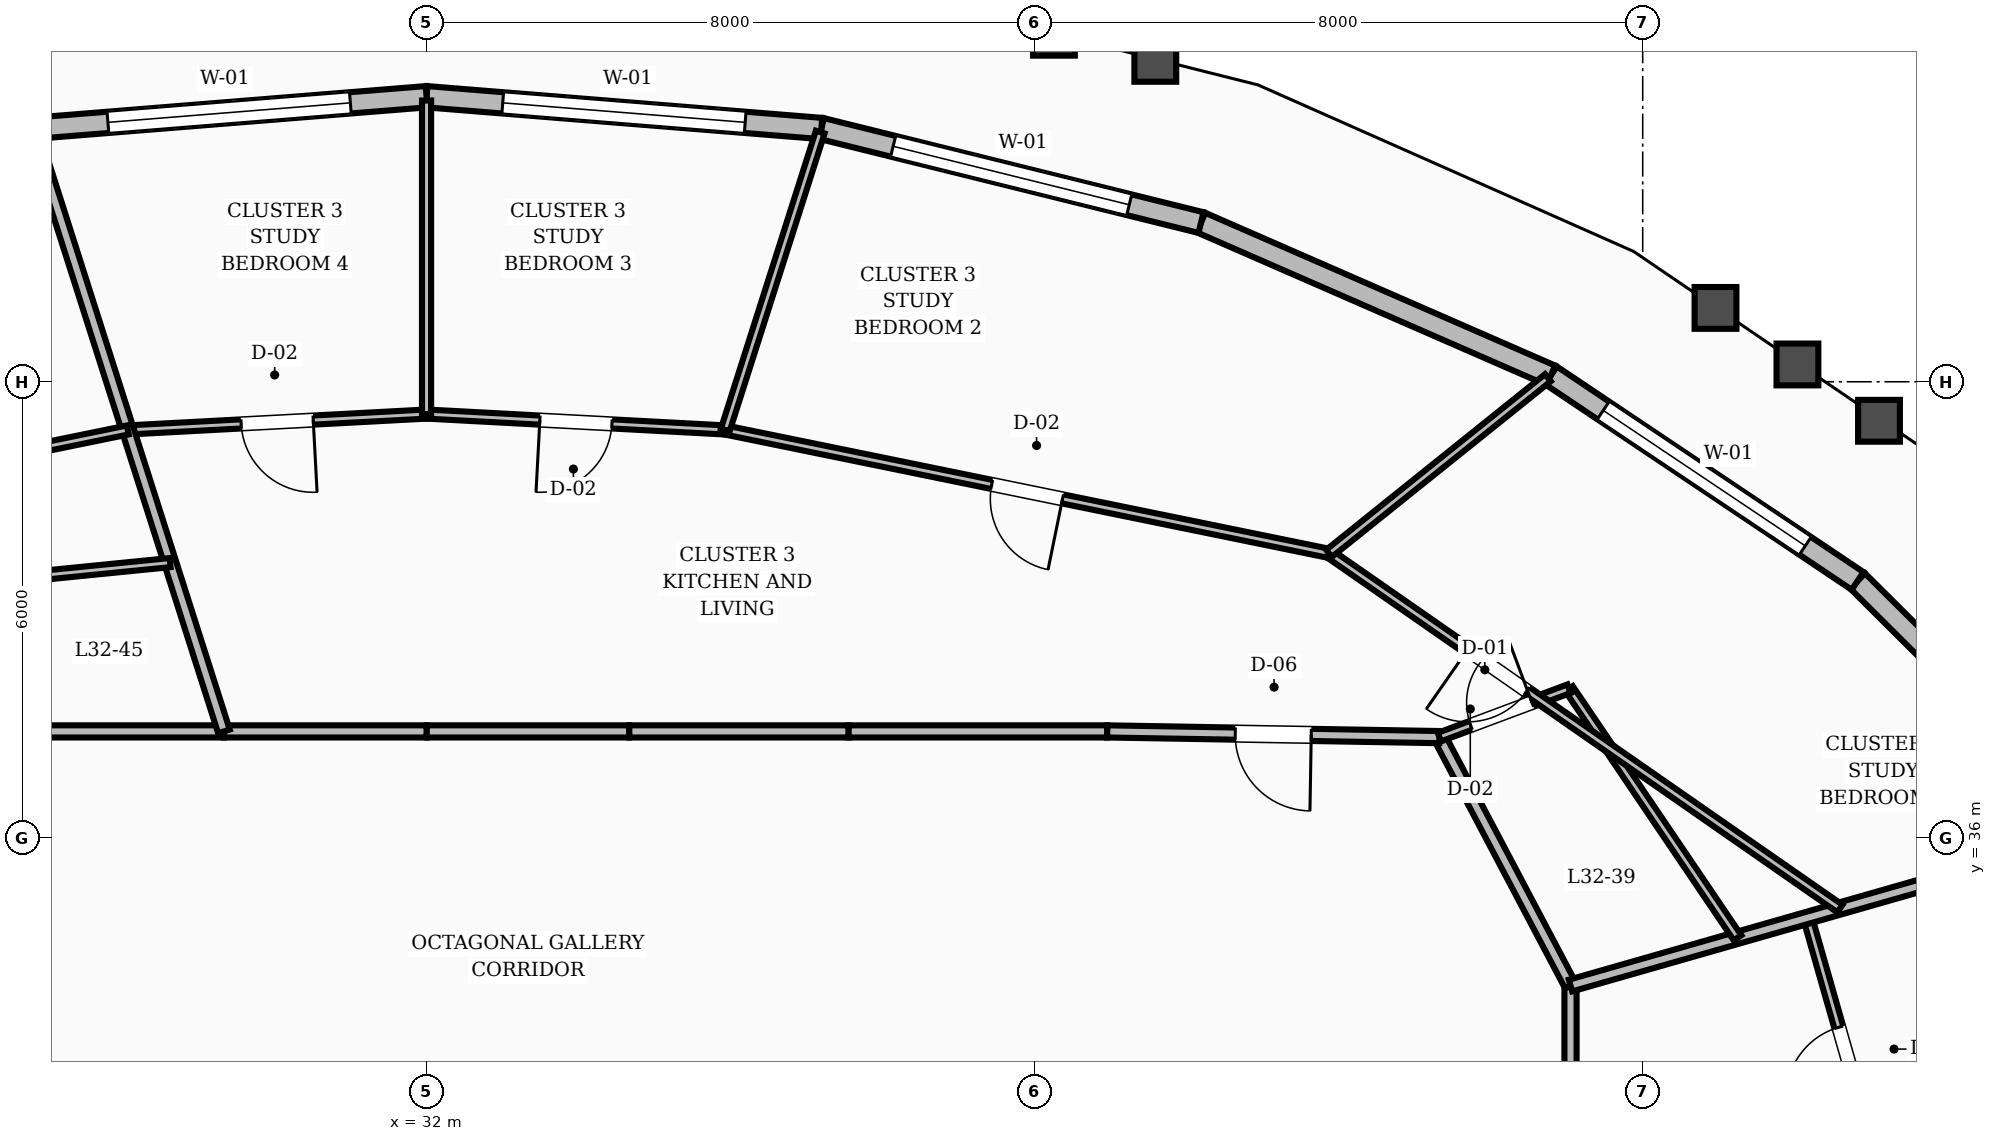
"""IFC4 building model, lengths in metres.
Left out: names, types, materials, properties, quantities, classifications, styles, units other than length and angle.
Written with IfcOpenShell. Run it as: python <this file> out.ifc"""

import sys

from ifc_helpers import new_model, si_unit, direction, frame, frame_2d, origin, place, context, subcontext, project, spatial, rectangle, extrude, element, fill, save


model = new_model("IFC4")
c1 = context("Model", 3, precision=1e-05, world=origin(), true_north=direction((0.0, 1.0)))
c2 = subcontext(c1, "Body", "Model", "MODEL_VIEW")
j1 = project(units=[si_unit("LENGTHUNIT", "METRE"), si_unit("PLANEANGLEUNIT", "RADIAN")], contexts=[c1])
p1 = place(None, origin())
s1 = spatial("IfcSite", under=j1, at=p1, CompositionType="ELEMENT")
p2 = place(p1, origin())
s2 = spatial("IfcBuilding", under=s1, at=p2, CompositionType="ELEMENT")
p3 = place(p2, frame((0.0, 0.0, 128.0)))
s3 = spatial("IfcBuildingStorey", under=s2, at=p3, CompositionType="ELEMENT", Elevation=128.0)
p4 = place(p3, frame((54.138, 36.083, 0.0), z_axis=(0.0, 0.0, 1.0), x_axis=(-0.708724927863, 0.705484923032, 0.0)))
e1 = element("IfcWall", 1, at=p4, inside=s3, PredefinedType="STANDARD", context=c2, shape_type="SweptSolid", body=[
    extrude(rectangle(XDim=4.672, YDim=0.28, at=frame_2d((2.336, 0.0))), origin(), (0.0, 0.0, 1.0), 2.82),
])
p5 = place(p3, frame((50.827, 39.379, 0.0), z_axis=(0.0, 0.0, 1.0), x_axis=(-0.830609353865, 0.556855547941, 0.0)))
e2 = element("IfcWall", 2, at=p5, inside=s3, PredefinedType="STANDARD", context=c2, shape_type="SweptSolid", body=[
    extrude(rectangle(XDim=4.858, YDim=0.28, at=frame_2d((2.429, 0.0))), origin(), (0.0, 0.0, 1.0), 2.82),
])
p6 = place(p5, frame((0.829, 0.0, 0.8)))
e3 = element("IfcOpeningElement", 3, at=p6, cuts=e2, PredefinedType="OPENING", context=c2, shape_type="SweptSolid", body=[
    extrude(rectangle(XDim=3.2, YDim=1.65, at=frame_2d((1.6, 0.825))), frame((0.0, 0.15, 0.0), z_axis=(0.0, -1.0, 0.0), x_axis=(1.0, 0.0, 0.0)), (0.0, 0.0, 1.0), 0.3),
])
p7 = place(p3, frame((46.792, 42.084, 0.0), z_axis=(0.0, 0.0, 1.0), x_axis=(-0.916453831221, 0.400140444394, 0.0)))
e4 = element("IfcWall", 4, at=p7, inside=s3, PredefinedType="STANDARD", context=c2, shape_type="SweptSolid", body=[
    extrude(rectangle(XDim=5.023, YDim=0.28, at=frame_2d((2.511, 0.0))), origin(), (0.0, 0.0, 1.0), 2.82),
])
p8 = place(p3, frame((42.189, 44.094, 0.0), z_axis=(0.0, 0.0, 1.0), x_axis=(-0.970639991073, 0.240536915526, 0.0)))
e5 = element("IfcWall", 5, at=p8, inside=s3, PredefinedType="STANDARD", context=c2, shape_type="SweptSolid", body=[
    extrude(rectangle(XDim=5.146, YDim=0.28, at=frame_2d((2.573, 0.0))), origin(), (0.0, 0.0, 1.0), 2.82),
])
p9 = place(p8, frame((0.973, 0.0, 0.8)))
e6 = element("IfcOpeningElement", 6, at=p9, cuts=e5, PredefinedType="OPENING", context=c2, shape_type="SweptSolid", body=[
    extrude(rectangle(XDim=3.2, YDim=1.65, at=frame_2d((1.6, 0.825))), frame((0.0, 0.15, 0.0), z_axis=(0.0, -1.0, 0.0), x_axis=(1.0, 0.0, 0.0)), (0.0, 0.0, 1.0), 0.3),
])
p10 = place(p3, frame((37.194, 45.332, 0.0), z_axis=(0.0, 0.0, 1.0), x_axis=(-0.996778227936, 0.080207009129, 0.0)))
e7 = element("IfcWall", 7, at=p10, inside=s3, PredefinedType="STANDARD", context=c2, shape_type="SweptSolid", body=[
    extrude(rectangle(XDim=5.211, YDim=0.28, at=frame_2d((2.605, 0.0))), origin(), (0.0, 0.0, 1.0), 2.82),
])
p11 = place(p10, frame((1.006, 0.0, 0.8)))
e8 = element("IfcOpeningElement", 8, at=p11, cuts=e7, PredefinedType="OPENING", context=c2, shape_type="SweptSolid", body=[
    extrude(rectangle(XDim=3.2, YDim=1.65, at=frame_2d((1.6, 0.825))), frame((0.0, 0.15, 0.0), z_axis=(0.0, -1.0, 0.0), x_axis=(1.0, 0.0, 0.0)), (0.0, 0.0, 1.0), 0.3),
])
p12 = place(p3, frame((32.0, 45.75, 0.0), z_axis=(0.0, 0.0, 1.0), x_axis=(-0.996778227936, -0.080207009129, 0.0)))
e9 = element("IfcWall", 9, at=p12, inside=s3, PredefinedType="STANDARD", context=c2, shape_type="SweptSolid", body=[
    extrude(rectangle(XDim=5.211, YDim=0.28, at=frame_2d((2.605, 0.0))), origin(), (0.0, 0.0, 1.0), 2.82),
])
p13 = place(p12, frame((1.006, 0.0, 0.8)))
e10 = element("IfcOpeningElement", 10, at=p13, cuts=e9, PredefinedType="OPENING", context=c2, shape_type="SweptSolid", body=[
    extrude(rectangle(XDim=3.2, YDim=1.65, at=frame_2d((1.6, 0.825))), frame((0.0, 0.15, 0.0), z_axis=(0.0, -1.0, 0.0), x_axis=(1.0, 0.0, 0.0)), (0.0, 0.0, 1.0), 0.3),
])
p14 = place(p3, frame((47.05, 30.234, 0.0), z_axis=(0.0, 0.0, 1.0), x_axis=(0.0, 1.0, 0.0)))
e11 = element("IfcWall", 11, at=p14, inside=s3, PredefinedType="SOLIDWALL", context=c2, shape_type="SweptSolid", body=[
    extrude(rectangle(XDim=3.822, YDim=0.16, at=frame_2d((1.911, 0.0))), origin(), (0.0, 0.0, 1.0), 2.8),
])
p15 = place(p3, frame((47.05, 34.056, 0.0), z_axis=(0.0, 0.0, 1.0), x_axis=(-0.466737093093, 0.884396113702, 0.0)))
e12 = element("IfcWall", 12, at=p15, inside=s3, PredefinedType="SOLIDWALL", context=c2, shape_type="SweptSolid", body=[
    extrude(rectangle(XDim=3.696, YDim=0.16, at=frame_2d((1.848, 0.0))), origin(), (0.0, 0.0, 1.0), 2.8),
])
p16 = place(p3, frame((45.325, 37.325, 0.0), z_axis=(0.0, 0.0, 1.0), x_axis=(-0.999853038912, 0.017143528788, 0.0)))
e13 = element("IfcWall", 13, at=p16, inside=s3, PredefinedType="SOLIDWALL", context=c2, shape_type="SweptSolid", body=[
    extrude(rectangle(XDim=4.372, YDim=0.16, at=frame_2d((2.186, 0.0))), origin(), (0.0, 0.0, 1.0), 2.8),
])
p17 = place(p16, frame((1.686, 0.0, 0.0)))
e14 = element("IfcOpeningElement", 14, at=p17, cuts=e13, PredefinedType="OPENING", context=c2, shape_type="SweptSolid", body=[
    extrude(rectangle(XDim=1.0, YDim=2.1, at=frame_2d((0.5, 1.05))), frame((0.0, 0.09, 0.0), z_axis=(0.0, -1.0, 0.0), x_axis=(1.0, 0.0, 0.0)), (0.0, 0.0, 1.0), 0.18),
])
p18 = place(p3, frame((40.954, 37.4, 0.0), z_axis=(0.0, 0.0, 1.0), x_axis=(-1.0, 0.0, 0.0)))
e15 = element("IfcWall", 15, at=p18, inside=s3, PredefinedType="SOLIDWALL", context=c2, shape_type="SweptSolid", body=[
    extrude(rectangle(XDim=3.403, YDim=0.16, at=frame_2d((1.702, 0.0))), origin(), (0.0, 0.0, 1.0), 2.8),
])
p19 = place(p3, frame((37.551, 37.4, 0.0), z_axis=(0.0, 0.0, 1.0), x_axis=(-1.0, 0.0, 0.0)))
e16 = element("IfcWall", 16, at=p19, inside=s3, PredefinedType="SOLIDWALL", context=c2, shape_type="SweptSolid", body=[
    extrude(rectangle(XDim=2.885, YDim=0.16, at=frame_2d((1.443, 0.0))), origin(), (0.0, 0.0, 1.0), 2.8),
])
for number, where, z_axis, x_axis in (
    (17, (34.665, 37.4, 0.0), (0.0, 0.0, 1.0), (-1.0, 0.0, 0.0)),
    (18, (32.0, 37.4, 0.0), (0.0, 0.0, 1.0), (-1.0, 0.0, 0.0)),
):
    element("IfcWall", number, at=place(p3, frame(where, z_axis=z_axis, x_axis=x_axis)), inside=s3, PredefinedType="SOLIDWALL", context=c2, shape_type="SweptSolid", body=[
        extrude(rectangle(XDim=2.665, YDim=0.16, at=frame_2d((1.333, 0.0))), origin(), (0.0, 0.0, 1.0), 2.8),
    ])
p20 = place(p3, frame((29.335, 37.4, 0.0), z_axis=(0.0, 0.0, 1.0), x_axis=(-1.0, 0.0, 0.0)))
e19 = element("IfcWall", 19, at=p20, inside=s3, PredefinedType="SOLIDWALL", context=c2, shape_type="SweptSolid", body=[
    extrude(rectangle(XDim=2.885, YDim=0.16, at=frame_2d((1.443, 0.0))), origin(), (0.0, 0.0, 1.0), 2.8),
])
p21 = place(p3, frame((51.251, 31.153, 0.0), z_axis=(0.0, 0.0, 1.0), x_axis=(-0.274312555961, 0.9616405886, 0.0)))
e20 = element("IfcWall", 20, at=p21, inside=s3, PredefinedType="PARTITIONING", context=c2, shape_type="SweptSolid", body=[
    extrude(rectangle(XDim=3.946, YDim=0.12, at=frame_2d((1.973, 0.0))), origin(), (0.0, 0.0, 1.0), 2.8),
])
p22 = place(p21, frame((1.498, 0.0, 0.0)))
e21 = element("IfcOpeningElement", 21, at=p22, cuts=e20, PredefinedType="OPENING", context=c2, shape_type="SweptSolid", body=[
    extrude(rectangle(XDim=0.95, YDim=2.1, at=frame_2d((0.475, 1.05))), frame((0.0, 0.07, 0.0), z_axis=(0.0, -1.0, 0.0), x_axis=(1.0, 0.0, 0.0)), (0.0, 0.0, 1.0), 0.14),
])
p23 = place(p3, frame((47.05, 34.056, 0.0), z_axis=(0.0, 0.0, 1.0), x_axis=(0.961443382808, 0.275002948446, 0.0)))
e22 = element("IfcWall", 22, at=p23, inside=s3, PredefinedType="SOLIDWALL", context=c2, shape_type="SweptSolid", body=[
    extrude(rectangle(XDim=7.322, YDim=0.16, at=frame_2d((3.661, 0.0))), origin(), (0.0, 0.0, 1.0), 2.8),
])
p24 = place(p3, frame((49.247, 34.685, 0.0), z_axis=(0.0, 0.0, 1.0), x_axis=(-0.560227188168, 0.828338999225, 0.0)))
e23 = element("IfcWall", 23, at=p24, inside=s3, PredefinedType="PARTITIONING", context=c2, shape_type="SweptSolid", body=[
    extrude(rectangle(XDim=3.957, YDim=0.12, at=frame_2d((1.978, 0.0))), origin(), (0.0, 0.0, 1.0), 2.8),
])
p25 = place(p3, frame((45.325, 37.325, 0.0), z_axis=(0.0, 0.0, 1.0), x_axis=(0.936818667413, 0.349815357561, 0.0)))
e24 = element("IfcWall", 24, at=p25, inside=s3, PredefinedType="PARTITIONING", context=c2, shape_type="SweptSolid", body=[
    extrude(rectangle(XDim=1.821, YDim=0.12, at=frame_2d((0.91, 0.0))), origin(), (0.0, 0.0, 1.0), 2.8),
])
p26 = place(p25, frame((0.44, 0.0, 0.0)))
e25 = element("IfcOpeningElement", 25, at=p26, cuts=e24, PredefinedType="OPENING", context=c2, shape_type="SweptSolid", body=[
    extrude(rectangle(XDim=0.86, YDim=2.1, at=frame_2d((0.43, 1.05))), frame((0.0, 0.07, 0.0), z_axis=(0.0, -1.0, 0.0), x_axis=(1.0, 0.0, 0.0)), (0.0, 0.0, 1.0), 0.14),
])
p27 = place(p3, frame((50.594, 35.07, 0.0), z_axis=(0.0, 0.0, 1.0), x_axis=(-0.821081459347, 0.570811034508, 0.0)))
e26 = element("IfcWall", 26, at=p27, inside=s3, PredefinedType="PARTITIONING", context=c2, shape_type="SweptSolid", body=[
    extrude(rectangle(XDim=8.186, YDim=0.12, at=frame_2d((4.093, 0.0))), origin(), (0.0, 0.0, 1.0), 2.8),
])
p28 = place(p27, frame((5.016, 0.0, 0.0)))
e27 = element("IfcOpeningElement", 27, at=p28, cuts=e26, PredefinedType="OPENING", context=c2, shape_type="SweptSolid", body=[
    extrude(rectangle(XDim=0.95, YDim=2.1, at=frame_2d((0.475, 1.05))), frame((0.0, 0.07, 0.0), z_axis=(0.0, -1.0, 0.0), x_axis=(1.0, 0.0, 0.0)), (0.0, 0.0, 1.0), 0.14),
])
p29 = place(p3, frame((43.873, 39.742, 0.0), z_axis=(0.0, 0.0, 1.0), x_axis=(-0.979737902763, 0.20028390322, 0.0)))
e28 = element("IfcWall", 28, at=p29, inside=s3, PredefinedType="PARTITIONING", context=c2, shape_type="SweptSolid", body=[
    extrude(rectangle(XDim=8.107, YDim=0.12, at=frame_2d((4.054, 0.0))), origin(), (0.0, 0.0, 1.0), 2.8),
])
p30 = place(p29, frame((3.579, 0.0, 0.0)))
e29 = element("IfcOpeningElement", 29, at=p30, cuts=e28, PredefinedType="OPENING", context=c2, shape_type="SweptSolid", body=[
    extrude(rectangle(XDim=0.95, YDim=2.1, at=frame_2d((0.475, 1.05))), frame((0.0, 0.07, 0.0), z_axis=(0.0, -1.0, 0.0), x_axis=(1.0, 0.0, 0.0)), (0.0, 0.0, 1.0), 0.14),
])
p31 = place(p3, frame((43.873, 39.742, 0.0), z_axis=(0.0, 0.0, 1.0), x_axis=(0.780010206727, 0.625766791547, 0.0)))
e30 = element("IfcWall", 30, at=p31, inside=s3, PredefinedType="PARTITIONING", context=c2, shape_type="SweptSolid", body=[
    extrude(rectangle(XDim=3.693, YDim=0.12, at=frame_2d((1.846, 0.0))), origin(), (0.0, 0.0, 1.0), 2.8),
])
p32 = place(p3, frame((35.93, 41.366, 0.0), z_axis=(0.0, 0.0, 1.0), x_axis=(-0.998589062602, 0.053102580455, 0.0)))
e31 = element("IfcWall", 31, at=p32, inside=s3, PredefinedType="PARTITIONING", context=c2, shape_type="SweptSolid", body=[
    extrude(rectangle(XDim=3.936, YDim=0.12, at=frame_2d((1.968, 0.0))), origin(), (0.0, 0.0, 1.0), 2.8),
])
p33 = place(p32, frame((1.493, 0.0, 0.0)))
e32 = element("IfcOpeningElement", 32, at=p33, cuts=e31, PredefinedType="OPENING", context=c2, shape_type="SweptSolid", body=[
    extrude(rectangle(XDim=0.95, YDim=2.1, at=frame_2d((0.475, 1.05))), frame((0.0, 0.07, 0.0), z_axis=(0.0, -1.0, 0.0), x_axis=(1.0, 0.0, 0.0)), (0.0, 0.0, 1.0), 0.14),
])
p34 = place(p3, frame((35.93, 41.366, 0.0), z_axis=(0.0, 0.0, 1.0), x_axis=(0.303752449649, 0.952750990203, 0.0)))
e33 = element("IfcWall", 33, at=p34, inside=s3, PredefinedType="PARTITIONING", context=c2, shape_type="SweptSolid", body=[
    extrude(rectangle(XDim=4.113, YDim=0.12, at=frame_2d((2.056, 0.0))), origin(), (0.0, 0.0, 1.0), 2.8),
])
p35 = place(p3, frame((32.0, 41.575, 0.0), z_axis=(0.0, 0.0, 1.0), x_axis=(-0.998589062602, -0.053102580455, 0.0)))
e34 = element("IfcWall", 34, at=p35, inside=s3, PredefinedType="PARTITIONING", context=c2, shape_type="SweptSolid", body=[
    extrude(rectangle(XDim=3.936, YDim=0.12, at=frame_2d((1.968, 0.0))), origin(), (0.0, 0.0, 1.0), 2.8),
])
p36 = place(p35, frame((1.493, 0.0, 0.0)))
e35 = element("IfcOpeningElement", 35, at=p36, cuts=e34, PredefinedType="OPENING", context=c2, shape_type="SweptSolid", body=[
    extrude(rectangle(XDim=0.95, YDim=2.1, at=frame_2d((0.475, 1.05))), frame((0.0, 0.07, 0.0), z_axis=(0.0, -1.0, 0.0), x_axis=(1.0, 0.0, 0.0)), (0.0, 0.0, 1.0), 0.14),
])
p37 = place(p3, frame((32.0, 41.575, 0.0), z_axis=(0.0, 0.0, 1.0), x_axis=(0.0, 1.0, 0.0)))
e36 = element("IfcWall", 36, at=p37, inside=s3, PredefinedType="PARTITIONING", context=c2, shape_type="SweptSolid", body=[
    extrude(rectangle(XDim=4.125, YDim=0.12, at=frame_2d((2.062, 0.0))), origin(), (0.0, 0.0, 1.0), 2.8),
])
p38 = place(p3, frame((29.335, 37.4, 0.0), z_axis=(0.0, 0.0, 1.0), x_axis=(-0.303774698935, 0.952743896484, 0.0)))
e37 = element("IfcWall", 37, at=p38, inside=s3, PredefinedType="SOLIDWALL", context=c2, shape_type="SweptSolid", body=[
    extrude(rectangle(XDim=8.276, YDim=0.16, at=frame_2d((4.138, 0.0))), origin(), (0.0, 0.0, 1.0), 2.8),
])
p39 = place(p3, frame((28.626, 39.621, 0.0), z_axis=(0.0, 0.0, 1.0), x_axis=(-0.995062761534, -0.099247673062, 0.0)))
e38 = element("IfcWall", 38, at=p39, inside=s3, PredefinedType="PARTITIONING", context=c2, shape_type="SweptSolid", body=[
    extrude(rectangle(XDim=3.493, YDim=0.12, at=frame_2d((1.747, 0.0))), origin(), (0.0, 0.0, 1.0), 2.8),
])
p40 = place(p3, frame((28.07, 41.366, 0.0), z_axis=(0.0, 0.0, 1.0), x_axis=(-0.979737902763, -0.20028390322, 0.0)))
e39 = element("IfcWall", 39, at=p40, inside=s3, PredefinedType="PARTITIONING", context=c2, shape_type="SweptSolid", body=[
    extrude(rectangle(XDim=8.107, YDim=0.12, at=frame_2d((4.054, 0.0))), origin(), (0.0, 0.0, 1.0), 2.8),
])
p41 = place(p40, frame((4.96, 0.0, 0.0)))
e40 = element("IfcOpeningElement", 40, at=p41, cuts=e39, PredefinedType="OPENING", context=c2, shape_type="SweptSolid", body=[
    extrude(rectangle(XDim=0.95, YDim=2.1, at=frame_2d((0.475, 1.05))), frame((0.0, 0.07, 0.0), z_axis=(0.0, -1.0, 0.0), x_axis=(1.0, 0.0, 0.0)), (0.0, 0.0, 1.0), 0.14),
])
p42 = place(p6, origin())
e41 = element("IfcWindow", 41, at=p42, inside=s3, PartitioningType="SINGLE_PANEL", PredefinedType="WINDOW", context=c2, shape_type="SweptSolid", body=[
    extrude(rectangle(XDim=3.2, YDim=1.65, at=frame_2d((1.6, 0.825))), frame((0.0, 0.03, 0.0), z_axis=(0.0, -1.0, 0.0), x_axis=(1.0, 0.0, 0.0)), (0.0, 0.0, 1.0), 0.06),
])
fill(e3, e41)
p43 = place(p9, origin())
e42 = element("IfcWindow", 42, at=p43, inside=s3, PartitioningType="SINGLE_PANEL", PredefinedType="WINDOW", context=c2, shape_type="SweptSolid", body=[
    extrude(rectangle(XDim=3.2, YDim=1.65, at=frame_2d((1.6, 0.825))), frame((0.0, 0.03, 0.0), z_axis=(0.0, -1.0, 0.0), x_axis=(1.0, 0.0, 0.0)), (0.0, 0.0, 1.0), 0.06),
])
fill(e6, e42)
p44 = place(p11, origin())
e43 = element("IfcWindow", 43, at=p44, inside=s3, PartitioningType="SINGLE_PANEL", PredefinedType="WINDOW", context=c2, shape_type="SweptSolid", body=[
    extrude(rectangle(XDim=3.2, YDim=1.65, at=frame_2d((1.6, 0.825))), frame((0.0, 0.03, 0.0), z_axis=(0.0, -1.0, 0.0), x_axis=(1.0, 0.0, 0.0)), (0.0, 0.0, 1.0), 0.06),
])
fill(e8, e43)
p45 = place(p13, origin())
e44 = element("IfcWindow", 44, at=p45, inside=s3, PartitioningType="SINGLE_PANEL", PredefinedType="WINDOW", context=c2, shape_type="SweptSolid", body=[
    extrude(rectangle(XDim=3.2, YDim=1.65, at=frame_2d((1.6, 0.825))), frame((0.0, 0.03, 0.0), z_axis=(0.0, -1.0, 0.0), x_axis=(1.0, 0.0, 0.0)), (0.0, 0.0, 1.0), 0.06),
])
fill(e10, e44)
p46 = place(p22, origin())
e45 = element("IfcDoor", 45, at=p46, inside=s3, OperationType="SINGLE_SWING_LEFT", PredefinedType="DOOR", context=c2, shape_type="SweptSolid", body=[
    extrude(rectangle(XDim=0.95, YDim=2.1, at=frame_2d((0.475, 1.05))), frame((0.0, 0.025, 0.0), z_axis=(0.0, -1.0, 0.0), x_axis=(1.0, 0.0, 0.0)), (0.0, 0.0, 1.0), 0.05),
])
fill(e21, e45)
p47 = place(p26, origin())
e46 = element("IfcDoor", 46, at=p47, inside=s3, OperationType="SINGLE_SWING_RIGHT", PredefinedType="DOOR", context=c2, shape_type="SweptSolid", body=[
    extrude(rectangle(XDim=0.86, YDim=2.1, at=frame_2d((0.43, 1.05))), frame((0.0, 0.025, 0.0), z_axis=(0.0, -1.0, 0.0), x_axis=(1.0, 0.0, 0.0)), (0.0, 0.0, 1.0), 0.05),
])
fill(e25, e46)
p48 = place(p17, origin())
e47 = element("IfcDoor", 47, at=p48, inside=s3, OperationType="SINGLE_SWING_LEFT", PredefinedType="DOOR", context=c2, shape_type="SweptSolid", body=[
    extrude(rectangle(XDim=1.0, YDim=2.1, at=frame_2d((0.5, 1.05))), frame((0.0, 0.025, 0.0), z_axis=(0.0, -1.0, 0.0), x_axis=(1.0, 0.0, 0.0)), (0.0, 0.0, 1.0), 0.05),
])
fill(e14, e47)
p49 = place(p28, origin())
e48 = element("IfcDoor", 48, at=p49, inside=s3, OperationType="SINGLE_SWING_RIGHT", PredefinedType="DOOR", context=c2, shape_type="SweptSolid", body=[
    extrude(rectangle(XDim=0.95, YDim=2.1, at=frame_2d((0.475, 1.05))), frame((0.0, 0.025, 0.0), z_axis=(0.0, -1.0, 0.0), x_axis=(1.0, 0.0, 0.0)), (0.0, 0.0, 1.0), 0.05),
])
fill(e27, e48)
p50 = place(p30, origin())
e49 = element("IfcDoor", 49, at=p50, inside=s3, OperationType="SINGLE_SWING_LEFT", PredefinedType="DOOR", context=c2, shape_type="SweptSolid", body=[
    extrude(rectangle(XDim=0.95, YDim=2.1, at=frame_2d((0.475, 1.05))), frame((0.0, 0.025, 0.0), z_axis=(0.0, -1.0, 0.0), x_axis=(1.0, 0.0, 0.0)), (0.0, 0.0, 1.0), 0.05),
])
fill(e29, e49)
p51 = place(p33, origin())
e50 = element("IfcDoor", 50, at=p51, inside=s3, OperationType="SINGLE_SWING_RIGHT", PredefinedType="DOOR", context=c2, shape_type="SweptSolid", body=[
    extrude(rectangle(XDim=0.95, YDim=2.1, at=frame_2d((0.475, 1.05))), frame((0.0, 0.025, 0.0), z_axis=(0.0, -1.0, 0.0), x_axis=(1.0, 0.0, 0.0)), (0.0, 0.0, 1.0), 0.05),
])
fill(e32, e50)
p52 = place(p36, origin())
e51 = element("IfcDoor", 51, at=p52, inside=s3, OperationType="SINGLE_SWING_LEFT", PredefinedType="DOOR", context=c2, shape_type="SweptSolid", body=[
    extrude(rectangle(XDim=0.95, YDim=2.1, at=frame_2d((0.475, 1.05))), frame((0.0, 0.025, 0.0), z_axis=(0.0, -1.0, 0.0), x_axis=(1.0, 0.0, 0.0)), (0.0, 0.0, 1.0), 0.05),
])
fill(e35, e51)
save(model, sys.argv[1])
